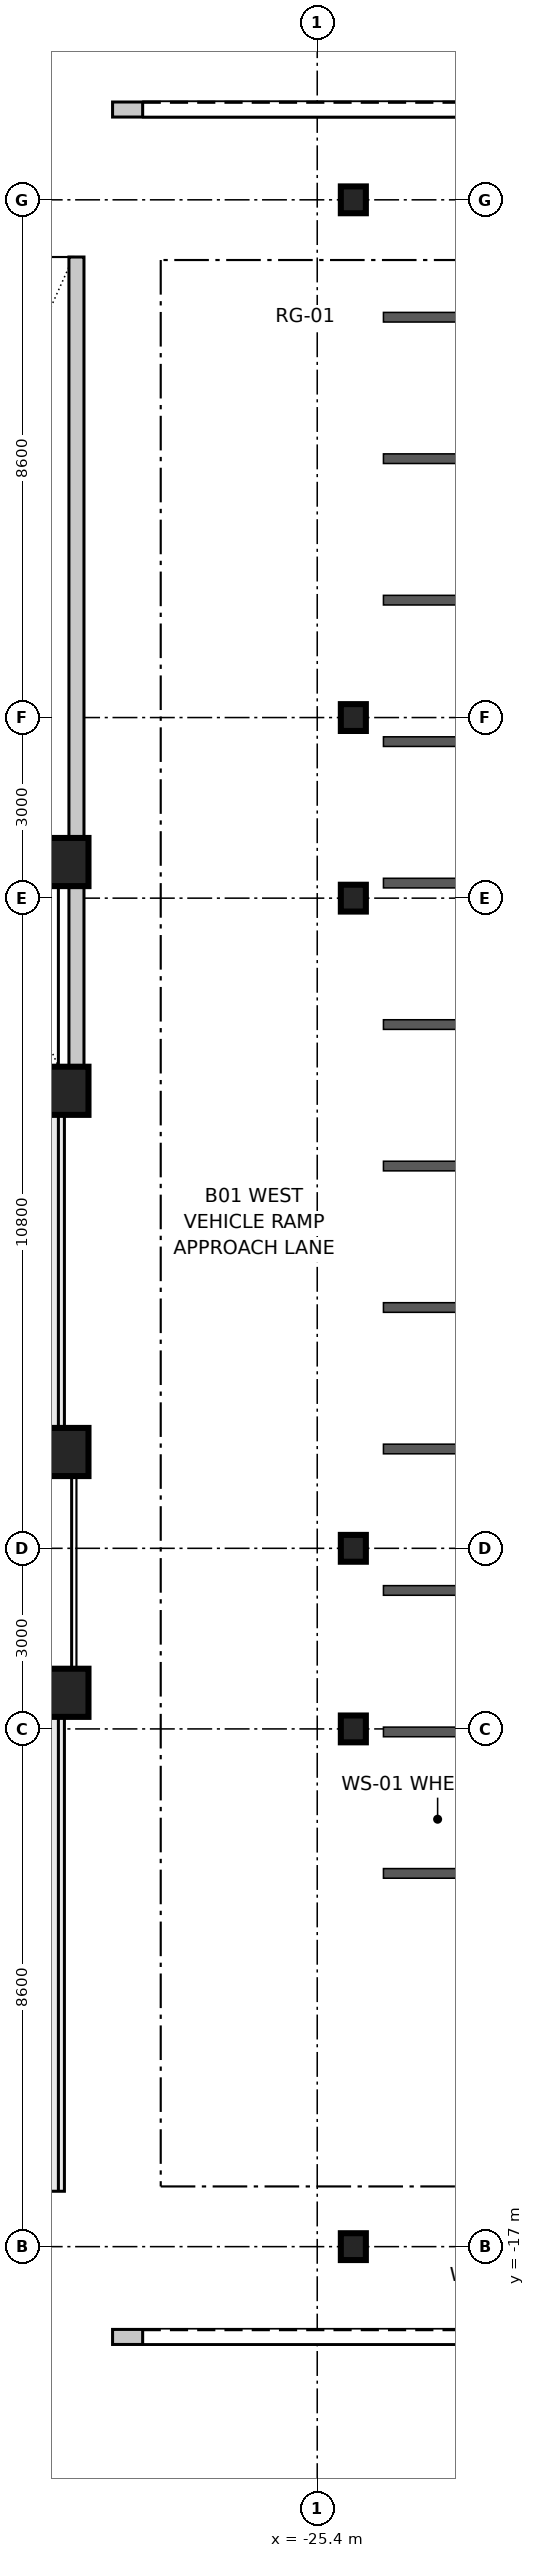
"""IFC4 building model, lengths in metres.
Left out: names, types, materials, properties, quantities, classifications, styles, units other than length and angle.
Written with IfcOpenShell. Run it as: python <this file> out.ifc"""

import sys

from ifc_helpers import new_model, si_unit, direction, frame, frame_2d, origin, origin_2d, place, context, subcontext, project, spatial, rectangle, i_section, extrude, source, transform, mapped, element, fill, save


model = new_model("IFC4")
c1 = context("Model", 3, precision=1e-05, world=origin(), true_north=direction((0.0, 1.0)))
c2 = subcontext(c1, "Body", "Model", "MODEL_VIEW")
j1 = project(units=[si_unit("LENGTHUNIT", "METRE"), si_unit("PLANEANGLEUNIT", "RADIAN")], contexts=[c1])
p1 = place(None, origin())
s1 = spatial("IfcSite", under=j1, at=p1, CompositionType="ELEMENT")
p2 = place(p1, origin())
s2 = spatial("IfcBuilding", under=s1, at=p2, CompositionType="ELEMENT")
p3 = place(p2, frame((0.0, 0.0, -5.4)))
s3 = spatial("IfcBuildingStorey", under=s2, at=p3, CompositionType="ELEMENT", Elevation=-5.4)
m1 = source(origin(), c2, "Body", "SweptSolid", [
    extrude(rectangle(XDim=0.8, YDim=0.8, at=origin_2d()), origin(), (0.0, 0.0, 1.0), 5.355),
])
for number, where, z_axis, x_axis in (
    (1, (-29.6, -7.8, 0.0), (0.0, 0.0, 1.0), (1.0, 0.0, 0.0)),
    (2, (-29.6, -3.8, 0.0), (0.0, 0.0, 1.0), (1.0, 0.0, 0.0)),
    (3, (-29.6, 2.2, 0.0), (0.0, 0.0, 1.0), (1.0, 0.0, 0.0)),
    (4, (-29.6, 6.0, 0.0), (0.0, 0.0, 1.0), (1.0, 0.0, 0.0)),
):
    element("IfcColumn", number, at=place(p3, frame(where, z_axis=z_axis, x_axis=x_axis)), inside=s3, PredefinedType="COLUMN", context=c2, shape_type="MappedRepresentation", body=[
        mapped(m1, transform((0.0, 0.0, 0.0), scale=1.0)),
    ])
m2 = source(origin(), c2, "Body", "SweptSolid", [
    extrude(i_section(OverallWidth=0.416, OverallDepth=0.446, WebThickness=0.025, FlangeThickness=0.04, at=origin_2d()), origin(), (0.0, 0.0, 1.0), 5.355),
])
for number, where, z_axis, x_axis in (
    (5, (-24.8, -17.0, 0.0), (0.0, 0.0, 1.0), (1.0, 0.0, 0.0)),
    (6, (-24.8, -8.4, 0.0), (0.0, 0.0, 1.0), (1.0, 0.0, 0.0)),
    (7, (-24.8, -5.4, 0.0), (0.0, 0.0, 1.0), (1.0, 0.0, 0.0)),
    (8, (-24.8, 5.4, 0.0), (0.0, 0.0, 1.0), (1.0, 0.0, 0.0)),
    (9, (-24.8, 8.4, 0.0), (0.0, 0.0, 1.0), (1.0, 0.0, 0.0)),
    (10, (-24.8, 17.0, 0.0), (0.0, 0.0, 1.0), (1.0, 0.0, 0.0)),
):
    element("IfcColumn", number, at=place(p3, frame(where, z_axis=z_axis, x_axis=x_axis)), inside=s3, PredefinedType="COLUMN", context=c2, shape_type="MappedRepresentation", body=[
        mapped(m2, transform((0.0, 0.0, 0.0), scale=1.0)),
    ])
m3 = source(origin(), c2, "Body", "SweptSolid", [
    extrude(rectangle(XDim=14.0, YDim=0.25, at=frame_2d((7.0, 0.0))), origin(), (0.0, 0.0, 1.0), 1.3),
])
p4 = place(p3, frame((-29.4, 2.05, 0.0), z_axis=(0.0, 0.0, 1.0), x_axis=(0.0, 1.0, 0.0)))
e11 = element("IfcWall", 11, at=p4, inside=s3, PredefinedType="PARTITIONING", context=c2, shape_type="MappedRepresentation", body=[
    mapped(m3, transform((0.0, 0.0, 0.0), scale=1.0)),
])
m4 = source(origin(), c2, "Body", "SweptSolid", [
    extrude(rectangle(XDim=6.4, YDim=0.25, at=frame_2d((3.2, 0.0))), origin(), (0.0, 0.0, 1.0), 1.3),
])
p5 = place(p3, frame((-35.8, 2.05, 0.0), z_axis=(0.0, 0.0, 1.0), x_axis=(1.0, 0.0, 0.0)))
e12 = element("IfcWall", 12, at=p5, inside=s3, PredefinedType="PARTITIONING", context=c2, shape_type="MappedRepresentation", body=[
    mapped(m4, transform((0.0, 0.0, 0.0), scale=1.0)),
])
m5 = source(origin(), c2, "Body", "SweptSolid", [
    extrude(rectangle(XDim=6.4, YDim=0.25, at=frame_2d((3.2, 0.0))), origin(), (0.0, 0.0, 1.0), 4.95),
])
p6 = place(p3, frame((-28.8, -18.5, 0.0), z_axis=(0.0, 0.0, 1.0), x_axis=(1.0, 0.0, 0.0)))
e13 = element("IfcWall", 13, at=p6, inside=s3, PredefinedType="PARTITIONING", context=c2, shape_type="MappedRepresentation", body=[
    mapped(m5, transform((0.0, 0.0, 0.0), scale=1.0)),
])
p7 = place(p6, frame((0.5, 0.0, 0.0)))
e14 = element("IfcOpeningElement", 14, at=p7, cuts=e13, PredefinedType="OPENING", context=c2, shape_type="SweptSolid", body=[
    extrude(rectangle(XDim=5.4, YDim=3.1, at=frame_2d((2.7, 1.55))), frame((0.0, 0.135, 0.0), z_axis=(0.0, -1.0, 0.0), x_axis=(1.0, 0.0, 0.0)), (0.0, 0.0, 1.0), 0.27),
])
p8 = place(p3, frame((-28.8, 18.5, 0.0), z_axis=(0.0, 0.0, 1.0), x_axis=(1.0, 0.0, 0.0)))
e15 = element("IfcWall", 15, at=p8, inside=s3, PredefinedType="PARTITIONING", context=c2, shape_type="MappedRepresentation", body=[
    mapped(m5, transform((0.0, 0.0, 0.0), scale=1.0)),
])
p9 = place(p8, frame((0.5, 0.0, 0.0)))
e16 = element("IfcOpeningElement", 16, at=p9, cuts=e15, PredefinedType="OPENING", context=c2, shape_type="SweptSolid", body=[
    extrude(rectangle(XDim=5.4, YDim=3.1, at=frame_2d((2.7, 1.55))), frame((0.0, 0.135, 0.0), z_axis=(0.0, -1.0, 0.0), x_axis=(1.0, 0.0, 0.0)), (0.0, 0.0, 1.0), 0.27),
])
m6 = source(origin(), c2, "Body", "SweptSolid", [
    extrude(rectangle(XDim=5.4, YDim=3.1, at=frame_2d((2.7, 1.55))), frame((0.0, 0.025, 0.0), z_axis=(0.0, -1.0, 0.0), x_axis=(1.0, 0.0, 0.0)), (0.0, 0.0, 1.0), 0.05),
])
p10 = place(p7, origin())
e17 = element("IfcDoor", 17, at=p10, inside=s3, OperationType="ROLLINGUP", PredefinedType="GATE", context=c2, shape_type="MappedRepresentation", body=[
    mapped(m6, transform((0.0, 0.0, 0.0), scale=1.0)),
])
fill(e14, e17)
p11 = place(p9, origin())
e18 = element("IfcDoor", 18, at=p11, inside=s3, OperationType="ROLLINGUP", PredefinedType="GATE", context=c2, shape_type="MappedRepresentation", body=[
    mapped(m6, transform((0.0, 0.0, 0.0), scale=1.0)),
])
fill(e16, e18)
save(model, sys.argv[1])
